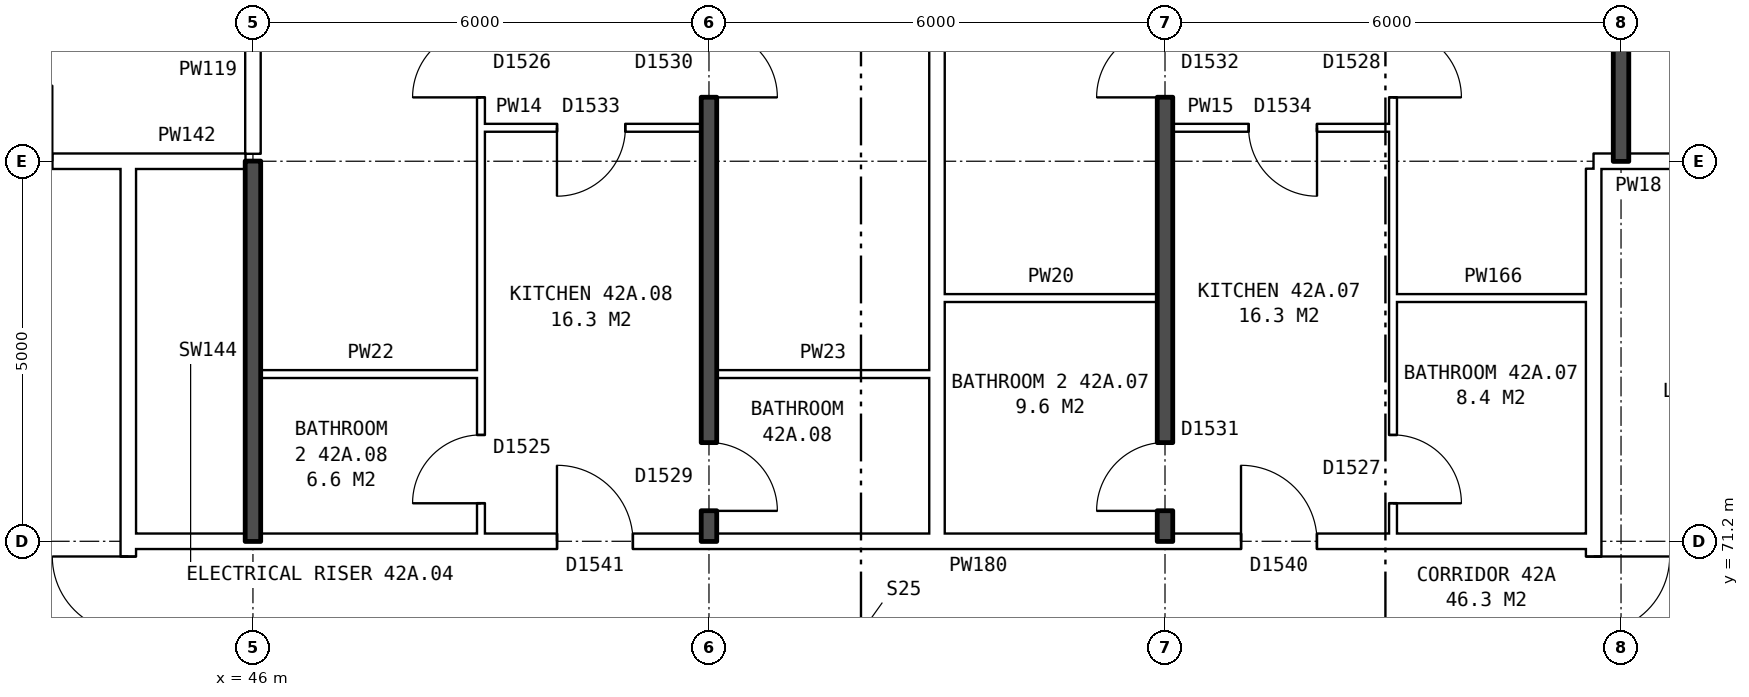
"""IFC4 building model, lengths in metres.
Left out: names, types, materials, properties, quantities, classifications, styles, units other than length and angle.
Written with IfcOpenShell. Run it as: python <this file> out.ifc"""

import sys

from ifc_helpers import new_model, si_unit, direction, frame, frame_2d, origin, place, context, subcontext, project, spatial, rectangle, extrude, element, fill, save


model = new_model("IFC4")
c1 = context("Model", 3, precision=1e-05, world=origin(), true_north=direction((0.0, 1.0)))
c2 = subcontext(c1, "Body", "Model", "MODEL_VIEW")
j1 = project(units=[si_unit("LENGTHUNIT", "METRE"), si_unit("PLANEANGLEUNIT", "RADIAN")], contexts=[c1])
p1 = place(None, origin())
s1 = spatial("IfcSite", under=j1, at=p1, CompositionType="ELEMENT")
p2 = place(p1, origin())
s2 = spatial("IfcBuilding", under=s1, at=p2, CompositionType="ELEMENT")
p3 = place(p2, frame((0.0, 0.0, 151.6)))
s3 = spatial("IfcBuildingStorey", under=s2, at=p3, CompositionType="ELEMENT", Elevation=151.6)
p4 = place(p3, frame((63.64, 63.9, 0.0), z_axis=(0.0, 0.0, 1.0), x_axis=(0.0, 1.0, 0.0)))
e1 = element("IfcWall", 1, at=p4, inside=s3, PredefinedType="PARTITIONING", context=c2, shape_type="SweptSolid", body=[
    extrude(rectangle(XDim=12.2, YDim=0.2, at=frame_2d((6.1, 0.0))), origin(), (0.0, 0.0, 1.0), 2.85),
])
p5 = place(p4, frame((5.1, 0.0, 0.0)))
e2 = element("IfcOpeningElement", 2, at=p5, cuts=e1, PredefinedType="OPENING", context=c2, shape_type="SweptSolid", body=[
    extrude(rectangle(XDim=2.0, YDim=2.1, at=frame_2d((1.0, 1.05))), frame((0.0, 0.11, 0.0), z_axis=(0.0, -1.0, 0.0), x_axis=(1.0, 0.0, 0.0)), (0.0, 0.0, 1.0), 0.22),
])
p6 = place(p3, frame((44.36, 63.9, 0.0), z_axis=(0.0, 0.0, 1.0), x_axis=(0.0, 1.0, 0.0)))
e3 = element("IfcWall", 3, at=p6, inside=s3, PredefinedType="PARTITIONING", context=c2, shape_type="SweptSolid", body=[
    extrude(rectangle(XDim=12.2, YDim=0.2, at=frame_2d((6.1, 0.0))), origin(), (0.0, 0.0, 1.0), 2.85),
])
p7 = place(p6, frame((5.1, 0.0, 0.0)))
e4 = element("IfcOpeningElement", 4, at=p7, cuts=e3, PredefinedType="OPENING", context=c2, shape_type="SweptSolid", body=[
    extrude(rectangle(XDim=2.0, YDim=2.1, at=frame_2d((1.0, 1.05))), frame((0.0, 0.11, 0.0), z_axis=(0.0, -1.0, 0.0), x_axis=(1.0, 0.0, 0.0)), (0.0, 0.0, 1.0), 0.22),
])
p8 = place(p3, frame((44.36, 71.2, 0.0), z_axis=(0.0, 0.0, 1.0), x_axis=(1.0, 0.0, 0.0)))
e5 = element("IfcWall", 5, at=p8, inside=s3, PredefinedType="PARTITIONING", context=c2, shape_type="SweptSolid", body=[
    extrude(rectangle(XDim=19.28, YDim=0.2, at=frame_2d((9.64, 0.0))), origin(), (0.0, 0.0, 1.0), 2.85),
])
p9 = place(p8, frame((14.64, 0.0, 0.0)))
e6 = element("IfcOpeningElement", 6, at=p9, cuts=e5, PredefinedType="OPENING", context=c2, shape_type="SweptSolid", body=[
    extrude(rectangle(XDim=1.0, YDim=2.1, at=frame_2d((0.5, 1.05))), frame((0.0, 0.11, 0.0), z_axis=(0.0, -1.0, 0.0), x_axis=(1.0, 0.0, 0.0)), (0.0, 0.0, 1.0), 0.22),
])
p10 = place(p8, frame((5.64, 0.0, 0.0)))
e7 = element("IfcOpeningElement", 7, at=p10, cuts=e5, PredefinedType="OPENING", context=c2, shape_type="SweptSolid", body=[
    extrude(rectangle(XDim=1.0, YDim=2.1, at=frame_2d((0.5, 1.05))), frame((0.0, 0.11, 0.0), z_axis=(0.0, -1.0, 0.0), x_axis=(1.0, 0.0, 0.0)), (0.0, 0.0, 1.0), 0.22),
])
p11 = place(p3, frame((46.1, 73.4, 0.0), z_axis=(0.0, 0.0, 1.0), x_axis=(1.0, 0.0, 0.0)))
e8 = element("IfcWall", 8, at=p11, inside=s3, PredefinedType="PARTITIONING", context=c2, shape_type="SweptSolid", body=[
    extrude(rectangle(XDim=2.9, YDim=0.1, at=frame_2d((1.45, 0.0))), origin(), (0.0, 0.0, 1.0), 2.85),
])
for number, where, z_axis, x_axis in (
    (9, (52.1, 73.4, 0.0), (0.0, 0.0, 1.0), (1.0, 0.0, 0.0)),
    (10, (55.1, 74.4, 0.0), (0.0, 0.0, 1.0), (1.0, 0.0, 0.0)),
):
    element("IfcWall", number, at=place(p3, frame(where, z_axis=z_axis, x_axis=x_axis)), inside=s3, PredefinedType="PARTITIONING", context=c2, shape_type="SweptSolid", body=[
        extrude(rectangle(XDim=2.8, YDim=0.1, at=frame_2d((1.4, 0.0))), origin(), (0.0, 0.0, 1.0), 2.85),
    ])
p12 = place(p3, frame((61.0, 74.4, 0.0), z_axis=(0.0, 0.0, 1.0), x_axis=(1.0, 0.0, 0.0)))
e11 = element("IfcWall", 11, at=p12, inside=s3, PredefinedType="PARTITIONING", context=c2, shape_type="SweptSolid", body=[
    extrude(rectangle(XDim=2.64, YDim=0.1, at=frame_2d((1.32, 0.0))), origin(), (0.0, 0.0, 1.0), 2.85),
])
p13 = place(p3, frame((41.36, 76.2, 0.0), z_axis=(0.0, 0.0, 1.0), x_axis=(1.0, 0.0, 0.0)))
e12 = element("IfcWall", 12, at=p13, inside=s3, PredefinedType="PARTITIONING", context=c2, shape_type="SweptSolid", body=[
    extrude(rectangle(XDim=3.0, YDim=0.2, at=frame_2d((1.5, 0.0))), origin(), (0.0, 0.0, 1.0), 2.85),
])
p14 = place(p13, frame((1.0, 0.0, 0.0)))
e13 = element("IfcOpeningElement", 13, at=p14, cuts=e12, PredefinedType="OPENING", context=c2, shape_type="SweptSolid", body=[
    extrude(rectangle(XDim=1.0, YDim=2.1, at=frame_2d((0.5, 1.05))), frame((0.0, 0.11, 0.0), z_axis=(0.0, -1.0, 0.0), x_axis=(1.0, 0.0, 0.0)), (0.0, 0.0, 1.0), 0.22),
])
p15 = place(p3, frame((44.36, 76.2, 0.0), z_axis=(0.0, 0.0, 1.0), x_axis=(1.0, 0.0, 0.0)))
e14 = element("IfcWall", 14, at=p15, inside=s3, PredefinedType="PARTITIONING", context=c2, shape_type="SweptSolid", body=[
    extrude(rectangle(XDim=1.54, YDim=0.2, at=frame_2d((0.77, 0.0))), origin(), (0.0, 0.0, 1.0), 2.85),
])
p16 = place(p3, frame((63.64, 76.2, 0.0), z_axis=(0.0, 0.0, 1.0), x_axis=(1.0, 0.0, 0.0)))
e15 = element("IfcWall", 15, at=p16, inside=s3, PredefinedType="PARTITIONING", context=c2, shape_type="SweptSolid", body=[
    extrude(rectangle(XDim=3.0, YDim=0.2, at=frame_2d((1.5, 0.0))), origin(), (0.0, 0.0, 1.0), 2.85),
])
p17 = place(p16, frame((1.18, 0.0, 0.0)))
e16 = element("IfcOpeningElement", 16, at=p17, cuts=e15, PredefinedType="OPENING", context=c2, shape_type="SweptSolid", body=[
    extrude(rectangle(XDim=1.0, YDim=2.1, at=frame_2d((0.5, 1.05))), frame((0.0, 0.11, 0.0), z_axis=(0.0, -1.0, 0.0), x_axis=(1.0, 0.0, 0.0)), (0.0, 0.0, 1.0), 0.22),
])
p18 = place(p3, frame((49.0, 76.64, 0.0), z_axis=(0.0, 0.0, 1.0), x_axis=(1.0, 0.0, 0.0)))
e17 = element("IfcWall", 17, at=p18, inside=s3, PredefinedType="PARTITIONING", context=c2, shape_type="SweptSolid", body=[
    extrude(rectangle(XDim=2.9, YDim=0.1, at=frame_2d((1.45, 0.0))), origin(), (0.0, 0.0, 1.0), 2.85),
])
p19 = place(p18, frame((1.0, 0.0, 0.0)))
e18 = element("IfcOpeningElement", 18, at=p19, cuts=e17, PredefinedType="OPENING", context=c2, shape_type="SweptSolid", body=[
    extrude(rectangle(XDim=0.9, YDim=2.1, at=frame_2d((0.45, 1.05))), frame((0.0, 0.06, 0.0), z_axis=(0.0, -1.0, 0.0), x_axis=(1.0, 0.0, 0.0)), (0.0, 0.0, 1.0), 0.12),
])
p20 = place(p3, frame((58.1, 76.64, 0.0), z_axis=(0.0, 0.0, 1.0), x_axis=(1.0, 0.0, 0.0)))
e19 = element("IfcWall", 19, at=p20, inside=s3, PredefinedType="PARTITIONING", context=c2, shape_type="SweptSolid", body=[
    extrude(rectangle(XDim=2.9, YDim=0.1, at=frame_2d((1.45, 0.0))), origin(), (0.0, 0.0, 1.0), 2.85),
])
p21 = place(p20, frame((1.0, 0.0, 0.0)))
e20 = element("IfcOpeningElement", 20, at=p21, cuts=e19, PredefinedType="OPENING", context=c2, shape_type="SweptSolid", body=[
    extrude(rectangle(XDim=0.9, YDim=2.1, at=frame_2d((0.45, 1.05))), frame((0.0, 0.06, 0.0), z_axis=(0.0, -1.0, 0.0), x_axis=(1.0, 0.0, 0.0)), (0.0, 0.0, 1.0), 0.12),
])
p22 = place(p3, frame((46.0, 71.2, 0.0), z_axis=(0.0, 0.0, 1.0), x_axis=(0.0, 1.0, 0.0)))
e21 = element("IfcWall", 21, at=p22, inside=s3, PredefinedType="SOLIDWALL", context=c2, shape_type="SweptSolid", body=[
    extrude(rectangle(XDim=5.0, YDim=0.2, at=frame_2d((2.5, 0.0))), origin(), (0.0, 0.0, 1.0), 2.85),
])
p23 = place(p3, frame((46.0, 76.3, 0.0), z_axis=(0.0, 0.0, 1.0), x_axis=(0.0, 1.0, 0.0)))
e22 = element("IfcWall", 22, at=p23, inside=s3, PredefinedType="PARTITIONING", context=c2, shape_type="SweptSolid", body=[
    extrude(rectangle(XDim=2.2, YDim=0.2, at=frame_2d((1.1, 0.0))), origin(), (0.0, 0.0, 1.0), 2.85),
])
p24 = place(p3, frame((49.0, 71.3, 0.0), z_axis=(0.0, 0.0, 1.0), x_axis=(0.0, 1.0, 0.0)))
e23 = element("IfcWall", 23, at=p24, inside=s3, PredefinedType="PARTITIONING", context=c2, shape_type="SweptSolid", body=[
    extrude(rectangle(XDim=14.34, YDim=0.1, at=frame_2d((7.17, 0.0))), origin(), (0.0, 0.0, 1.0), 2.85),
])
p25 = place(p24, frame((5.74, 0.0, 0.0)))
e24 = element("IfcOpeningElement", 24, at=p25, cuts=e23, PredefinedType="OPENING", context=c2, shape_type="SweptSolid", body=[
    extrude(rectangle(XDim=0.9, YDim=2.1, at=frame_2d((0.45, 1.05))), frame((0.0, 0.06, 0.0), z_axis=(0.0, -1.0, 0.0), x_axis=(1.0, 0.0, 0.0)), (0.0, 0.0, 1.0), 0.12),
])
p26 = place(p24, frame((0.4, 0.0, 0.0)))
e25 = element("IfcOpeningElement", 25, at=p26, cuts=e23, PredefinedType="OPENING", context=c2, shape_type="SweptSolid", body=[
    extrude(rectangle(XDim=0.9, YDim=2.1, at=frame_2d((0.45, 1.05))), frame((0.0, 0.06, 0.0), z_axis=(0.0, -1.0, 0.0), x_axis=(1.0, 0.0, 0.0)), (0.0, 0.0, 1.0), 0.12),
])
p27 = place(p3, frame((52.0, 71.2, 0.0), z_axis=(0.0, 0.0, 1.0), x_axis=(0.0, 1.0, 0.0)))
e26 = element("IfcWall", 26, at=p27, inside=s3, PredefinedType="SOLIDWALL", context=c2, shape_type="SweptSolid", body=[
    extrude(rectangle(XDim=14.44, YDim=0.2, at=frame_2d((7.22, 0.0))), origin(), (0.0, 0.0, 1.0), 2.85),
])
p28 = place(p27, frame((5.84, 0.0, 0.0)))
e27 = element("IfcOpeningElement", 27, at=p28, cuts=e26, PredefinedType="OPENING", context=c2, shape_type="SweptSolid", body=[
    extrude(rectangle(XDim=0.9, YDim=2.1, at=frame_2d((0.45, 1.05))), frame((0.0, 0.11, 0.0), z_axis=(0.0, -1.0, 0.0), x_axis=(1.0, 0.0, 0.0)), (0.0, 0.0, 1.0), 0.22),
])
p29 = place(p27, frame((0.4, 0.0, 0.0)))
e28 = element("IfcOpeningElement", 28, at=p29, cuts=e26, PredefinedType="OPENING", context=c2, shape_type="SweptSolid", body=[
    extrude(rectangle(XDim=0.9, YDim=2.1, at=frame_2d((0.45, 1.05))), frame((0.0, 0.11, 0.0), z_axis=(0.0, -1.0, 0.0), x_axis=(1.0, 0.0, 0.0)), (0.0, 0.0, 1.0), 0.22),
])
p30 = place(p3, frame((55.0, 71.3, 0.0), z_axis=(0.0, 0.0, 1.0), x_axis=(0.0, 1.0, 0.0)))
e29 = element("IfcWall", 29, at=p30, inside=s3, PredefinedType="PARTITIONING", context=c2, shape_type="SweptSolid", body=[
    extrude(rectangle(XDim=14.34, YDim=0.2, at=frame_2d((7.17, 0.0))), origin(), (0.0, 0.0, 1.0), 2.85),
])
p31 = place(p3, frame((58.0, 71.2, 0.0), z_axis=(0.0, 0.0, 1.0), x_axis=(0.0, 1.0, 0.0)))
e30 = element("IfcWall", 30, at=p31, inside=s3, PredefinedType="SOLIDWALL", context=c2, shape_type="SweptSolid", body=[
    extrude(rectangle(XDim=14.44, YDim=0.2, at=frame_2d((7.22, 0.0))), origin(), (0.0, 0.0, 1.0), 2.85),
])
p32 = place(p31, frame((5.84, 0.0, 0.0)))
e31 = element("IfcOpeningElement", 31, at=p32, cuts=e30, PredefinedType="OPENING", context=c2, shape_type="SweptSolid", body=[
    extrude(rectangle(XDim=0.9, YDim=2.1, at=frame_2d((0.45, 1.05))), frame((0.0, 0.11, 0.0), z_axis=(0.0, -1.0, 0.0), x_axis=(1.0, 0.0, 0.0)), (0.0, 0.0, 1.0), 0.22),
])
p33 = place(p31, frame((0.4, 0.0, 0.0)))
e32 = element("IfcOpeningElement", 32, at=p33, cuts=e30, PredefinedType="OPENING", context=c2, shape_type="SweptSolid", body=[
    extrude(rectangle(XDim=0.9, YDim=2.1, at=frame_2d((0.45, 1.05))), frame((0.0, 0.11, 0.0), z_axis=(0.0, -1.0, 0.0), x_axis=(1.0, 0.0, 0.0)), (0.0, 0.0, 1.0), 0.22),
])
p34 = place(p3, frame((61.0, 71.3, 0.0), z_axis=(0.0, 0.0, 1.0), x_axis=(0.0, 1.0, 0.0)))
e33 = element("IfcWall", 33, at=p34, inside=s3, PredefinedType="PARTITIONING", context=c2, shape_type="SweptSolid", body=[
    extrude(rectangle(XDim=14.34, YDim=0.1, at=frame_2d((7.17, 0.0))), origin(), (0.0, 0.0, 1.0), 2.85),
])
p35 = place(p34, frame((5.74, 0.0, 0.0)))
e34 = element("IfcOpeningElement", 34, at=p35, cuts=e33, PredefinedType="OPENING", context=c2, shape_type="SweptSolid", body=[
    extrude(rectangle(XDim=0.9, YDim=2.1, at=frame_2d((0.45, 1.05))), frame((0.0, 0.06, 0.0), z_axis=(0.0, -1.0, 0.0), x_axis=(1.0, 0.0, 0.0)), (0.0, 0.0, 1.0), 0.12),
])
p36 = place(p34, frame((0.4, 0.0, 0.0)))
e35 = element("IfcOpeningElement", 35, at=p36, cuts=e33, PredefinedType="OPENING", context=c2, shape_type="SweptSolid", body=[
    extrude(rectangle(XDim=0.9, YDim=2.1, at=frame_2d((0.45, 1.05))), frame((0.0, 0.06, 0.0), z_axis=(0.0, -1.0, 0.0), x_axis=(1.0, 0.0, 0.0)), (0.0, 0.0, 1.0), 0.12),
])
p37 = place(p3, frame((64.0, 76.2, 0.0), z_axis=(0.0, 0.0, 1.0), x_axis=(0.0, 1.0, 0.0)))
e36 = element("IfcWall", 36, at=p37, inside=s3, PredefinedType="SOLIDWALL", context=c2, shape_type="SweptSolid", body=[
    extrude(rectangle(XDim=9.44, YDim=0.2, at=frame_2d((4.72, 0.0))), origin(), (0.0, 0.0, 1.0), 2.85),
])
p38 = place(p5, frame((2.0, 0.0, 0.0), z_axis=(0.0, 0.0, 1.0), x_axis=(-1.0, 0.0, 0.0)))
e37 = element("IfcDoor", 37, at=p38, inside=s3, OperationType="DOUBLE_DOOR_SINGLE_SWING", PredefinedType="DOOR", context=c2, shape_type="SweptSolid", body=[
    extrude(rectangle(XDim=2.0, YDim=2.1, at=frame_2d((1.0, 1.05))), frame((0.0, 0.025, 0.0), z_axis=(0.0, -1.0, 0.0), x_axis=(1.0, 0.0, 0.0)), (0.0, 0.0, 1.0), 0.05),
])
fill(e2, e37)
p39 = place(p7, origin())
e38 = element("IfcDoor", 38, at=p39, inside=s3, OperationType="DOUBLE_DOOR_SINGLE_SWING", PredefinedType="DOOR", context=c2, shape_type="SweptSolid", body=[
    extrude(rectangle(XDim=2.0, YDim=2.1, at=frame_2d((1.0, 1.05))), frame((0.0, 0.025, 0.0), z_axis=(0.0, -1.0, 0.0), x_axis=(1.0, 0.0, 0.0)), (0.0, 0.0, 1.0), 0.05),
])
fill(e4, e38)
p40 = place(p35, frame((0.9, 0.0, 0.0), z_axis=(0.0, 0.0, 1.0), x_axis=(-1.0, 0.0, 0.0)))
e39 = element("IfcDoor", 39, at=p40, inside=s3, OperationType="SINGLE_SWING_RIGHT", PredefinedType="DOOR", context=c2, shape_type="SweptSolid", body=[
    extrude(rectangle(XDim=0.9, YDim=2.1, at=frame_2d((0.45, 1.05))), frame((0.0, 0.025, 0.0), z_axis=(0.0, -1.0, 0.0), x_axis=(1.0, 0.0, 0.0)), (0.0, 0.0, 1.0), 0.05),
])
fill(e34, e39)
p41 = place(p32, origin())
e40 = element("IfcDoor", 40, at=p41, inside=s3, OperationType="SINGLE_SWING_LEFT", PredefinedType="DOOR", context=c2, shape_type="SweptSolid", body=[
    extrude(rectangle(XDim=0.9, YDim=2.1, at=frame_2d((0.45, 1.05))), frame((0.0, 0.025, 0.0), z_axis=(0.0, -1.0, 0.0), x_axis=(1.0, 0.0, 0.0)), (0.0, 0.0, 1.0), 0.05),
])
fill(e31, e40)
p42 = place(p9, origin())
e41 = element("IfcDoor", 41, at=p42, inside=s3, OperationType="SINGLE_SWING_LEFT", PredefinedType="DOOR", context=c2, shape_type="SweptSolid", body=[
    extrude(rectangle(XDim=1.0, YDim=2.1, at=frame_2d((0.5, 1.05))), frame((0.0, 0.025, 0.0), z_axis=(0.0, -1.0, 0.0), x_axis=(1.0, 0.0, 0.0)), (0.0, 0.0, 1.0), 0.05),
])
fill(e6, e41)
p43 = place(p21, frame((0.9, 0.0, 0.0), z_axis=(0.0, 0.0, 1.0), x_axis=(-1.0, 0.0, 0.0)))
e42 = element("IfcDoor", 42, at=p43, inside=s3, OperationType="SINGLE_SWING_LEFT", PredefinedType="DOOR", context=c2, shape_type="SweptSolid", body=[
    extrude(rectangle(XDim=0.9, YDim=2.1, at=frame_2d((0.45, 1.05))), frame((0.0, 0.025, 0.0), z_axis=(0.0, -1.0, 0.0), x_axis=(1.0, 0.0, 0.0)), (0.0, 0.0, 1.0), 0.05),
])
fill(e20, e42)
p44 = place(p36, frame((0.9, 0.0, 0.0), z_axis=(0.0, 0.0, 1.0), x_axis=(-1.0, 0.0, 0.0)))
e43 = element("IfcDoor", 43, at=p44, inside=s3, OperationType="SINGLE_SWING_RIGHT", PredefinedType="DOOR", context=c2, shape_type="SweptSolid", body=[
    extrude(rectangle(XDim=0.9, YDim=2.1, at=frame_2d((0.45, 1.05))), frame((0.0, 0.025, 0.0), z_axis=(0.0, -1.0, 0.0), x_axis=(1.0, 0.0, 0.0)), (0.0, 0.0, 1.0), 0.05),
])
fill(e35, e43)
p45 = place(p33, origin())
e44 = element("IfcDoor", 44, at=p45, inside=s3, OperationType="SINGLE_SWING_LEFT", PredefinedType="DOOR", context=c2, shape_type="SweptSolid", body=[
    extrude(rectangle(XDim=0.9, YDim=2.1, at=frame_2d((0.45, 1.05))), frame((0.0, 0.025, 0.0), z_axis=(0.0, -1.0, 0.0), x_axis=(1.0, 0.0, 0.0)), (0.0, 0.0, 1.0), 0.05),
])
fill(e32, e44)
p46 = place(p28, frame((0.9, 0.0, 0.0), z_axis=(0.0, 0.0, 1.0), x_axis=(-1.0, 0.0, 0.0)))
e45 = element("IfcDoor", 45, at=p46, inside=s3, OperationType="SINGLE_SWING_RIGHT", PredefinedType="DOOR", context=c2, shape_type="SweptSolid", body=[
    extrude(rectangle(XDim=0.9, YDim=2.1, at=frame_2d((0.45, 1.05))), frame((0.0, 0.025, 0.0), z_axis=(0.0, -1.0, 0.0), x_axis=(1.0, 0.0, 0.0)), (0.0, 0.0, 1.0), 0.05),
])
fill(e27, e45)
p47 = place(p25, origin())
e46 = element("IfcDoor", 46, at=p47, inside=s3, OperationType="SINGLE_SWING_LEFT", PredefinedType="DOOR", context=c2, shape_type="SweptSolid", body=[
    extrude(rectangle(XDim=0.9, YDim=2.1, at=frame_2d((0.45, 1.05))), frame((0.0, 0.025, 0.0), z_axis=(0.0, -1.0, 0.0), x_axis=(1.0, 0.0, 0.0)), (0.0, 0.0, 1.0), 0.05),
])
fill(e24, e46)
p48 = place(p10, origin())
e47 = element("IfcDoor", 47, at=p48, inside=s3, OperationType="SINGLE_SWING_LEFT", PredefinedType="DOOR", context=c2, shape_type="SweptSolid", body=[
    extrude(rectangle(XDim=1.0, YDim=2.1, at=frame_2d((0.5, 1.05))), frame((0.0, 0.025, 0.0), z_axis=(0.0, -1.0, 0.0), x_axis=(1.0, 0.0, 0.0)), (0.0, 0.0, 1.0), 0.05),
])
fill(e7, e47)
p49 = place(p19, frame((0.9, 0.0, 0.0), z_axis=(0.0, 0.0, 1.0), x_axis=(-1.0, 0.0, 0.0)))
e48 = element("IfcDoor", 48, at=p49, inside=s3, OperationType="SINGLE_SWING_RIGHT", PredefinedType="DOOR", context=c2, shape_type="SweptSolid", body=[
    extrude(rectangle(XDim=0.9, YDim=2.1, at=frame_2d((0.45, 1.05))), frame((0.0, 0.025, 0.0), z_axis=(0.0, -1.0, 0.0), x_axis=(1.0, 0.0, 0.0)), (0.0, 0.0, 1.0), 0.05),
])
fill(e18, e48)
p50 = place(p29, frame((0.9, 0.0, 0.0), z_axis=(0.0, 0.0, 1.0), x_axis=(-1.0, 0.0, 0.0)))
e49 = element("IfcDoor", 49, at=p50, inside=s3, OperationType="SINGLE_SWING_RIGHT", PredefinedType="DOOR", context=c2, shape_type="SweptSolid", body=[
    extrude(rectangle(XDim=0.9, YDim=2.1, at=frame_2d((0.45, 1.05))), frame((0.0, 0.025, 0.0), z_axis=(0.0, -1.0, 0.0), x_axis=(1.0, 0.0, 0.0)), (0.0, 0.0, 1.0), 0.05),
])
fill(e28, e49)
p51 = place(p26, origin())
e50 = element("IfcDoor", 50, at=p51, inside=s3, OperationType="SINGLE_SWING_LEFT", PredefinedType="DOOR", context=c2, shape_type="SweptSolid", body=[
    extrude(rectangle(XDim=0.9, YDim=2.1, at=frame_2d((0.45, 1.05))), frame((0.0, 0.025, 0.0), z_axis=(0.0, -1.0, 0.0), x_axis=(1.0, 0.0, 0.0)), (0.0, 0.0, 1.0), 0.05),
])
fill(e25, e50)
save(model, sys.argv[1])
